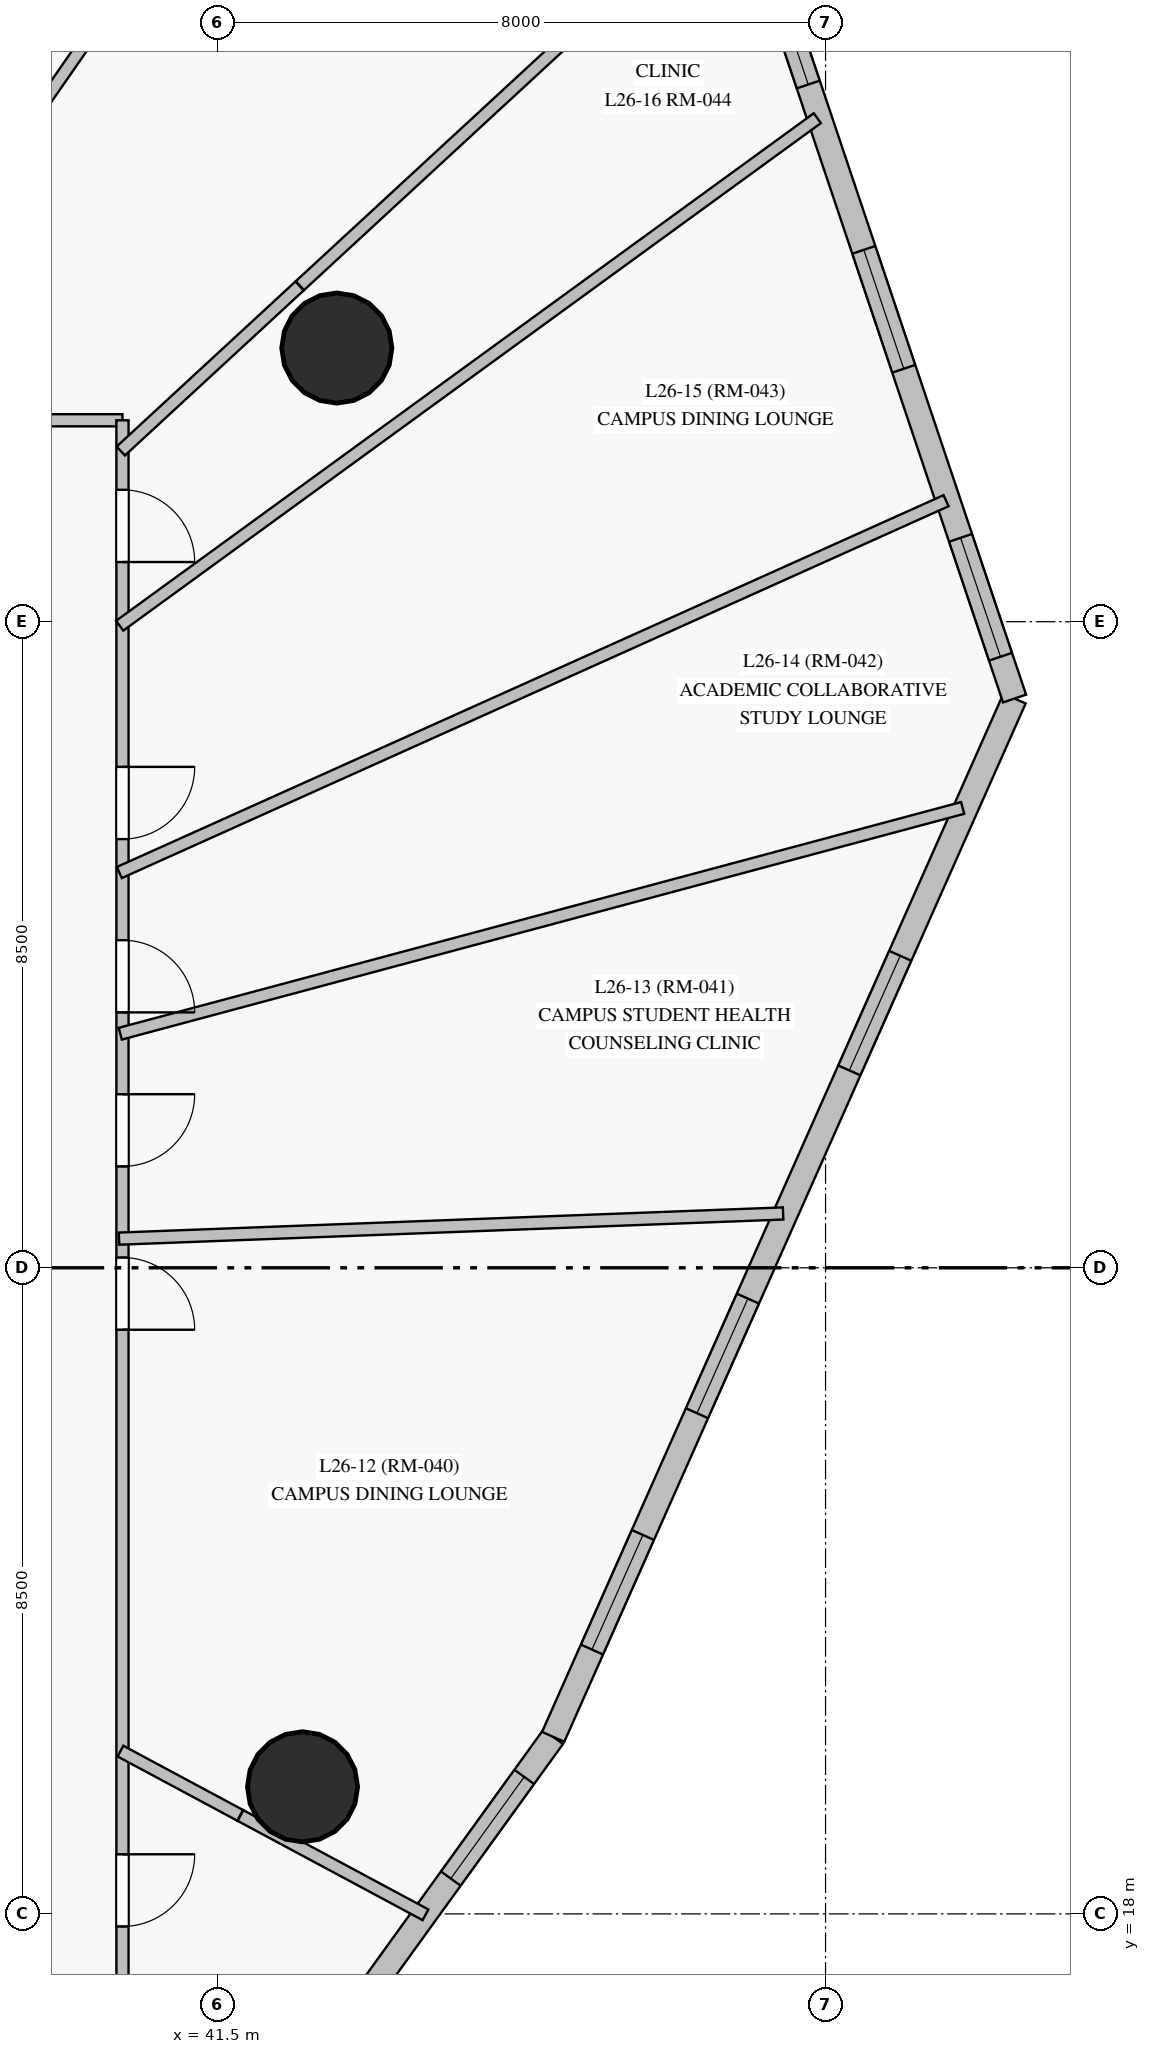
"""IFC4 building model, lengths in metres.
Left out: names, types, materials, properties, quantities, classifications, styles, units other than length and angle.
Written with IfcOpenShell. Run it as: python <this file> out.ifc"""

import sys

from ifc_helpers import new_model, si_unit, direction, frame, frame_2d, origin, origin_with_axes, origin_2d, place, context, subcontext, project, spatial, rectangle, circle, extrude, source, transform, mapped, element, fill, save


model = new_model("IFC4")
c1 = context("Model", 3, precision=1e-05, world=origin(), true_north=direction((0.0, 1.0)))
c2 = subcontext(c1, "Body", "Model", "MODEL_VIEW")
j1 = project(units=[si_unit("LENGTHUNIT", "METRE"), si_unit("PLANEANGLEUNIT", "RADIAN")], contexts=[c1])
p1 = place(None, origin())
s1 = spatial("IfcSite", under=j1, at=p1, CompositionType="ELEMENT")
p2 = place(p1, origin())
s2 = spatial("IfcBuilding", under=s1, at=p2, CompositionType="ELEMENT")
p3 = place(p2, frame((0.0, 0.0, 99.25)))
s3 = spatial("IfcBuildingStorey", under=s2, at=p3, CompositionType="ELEMENT", Elevation=99.25)
m1 = source(origin_with_axes(), c2, "Body", "SweptSolid", [
    extrude(circle(Radius=0.725, at=origin_2d()), origin(), (0.0, 0.0, 1.0), 3.05),
])
for number, where, z_axis, x_axis in (
    (1, (42.619, 19.672, 0.0), (0.0, 0.0, 1.0), (1.0, 0.0, 0.0)),
    (2, (43.07, 38.6, 0.0), (0.0, 0.0, 1.0), (1.0, 0.0, 0.0)),
):
    element("IfcColumn", number, at=place(p3, frame(where, z_axis=z_axis, x_axis=x_axis)), inside=s3, PredefinedType="COLUMN", context=c2, shape_type="MappedRepresentation", body=[
        mapped(m1, transform((0.0, 0.0, 0.0), scale=1.0)),
    ])
p4 = place(p3, frame((39.832, 11.906, 0.0), z_axis=(0.0, 0.0, 1.0), x_axis=(0.585524008993, 0.810655065298, 0.0)))
e3 = element("IfcWall", 3, at=p4, inside=s3, PredefinedType="SOLIDWALL", context=c2, shape_type="SweptSolid", body=[
    extrude(rectangle(XDim=10.391, YDim=0.32, at=frame_2d((5.196, 0.0))), origin(), (0.0, 0.0, 1.0), 2.825),
])
p5 = place(p4, frame((1.255, 0.0, 0.85)))
e4 = element("IfcOpeningElement", 4, at=p5, cuts=e3, PredefinedType="OPENING", context=c2, shape_type="SweptSolid", body=[
    extrude(rectangle(XDim=1.65, YDim=1.65, at=frame_2d((0.825, 0.825))), frame((0.0, 0.17, 0.0), z_axis=(0.0, -1.0, 0.0), x_axis=(1.0, 0.0, 0.0)), (0.0, 0.0, 1.0), 0.34),
])
p6 = place(p4, frame((4.656, 0.0, 0.85)))
e5 = element("IfcOpeningElement", 5, at=p6, cuts=e3, PredefinedType="OPENING", context=c2, shape_type="SweptSolid", body=[
    extrude(rectangle(XDim=1.65, YDim=1.65, at=frame_2d((0.825, 0.825))), frame((0.0, 0.17, 0.0), z_axis=(0.0, -1.0, 0.0), x_axis=(1.0, 0.0, 0.0)), (0.0, 0.0, 1.0), 0.34),
])
p7 = place(p4, frame((8.091, 0.0, 0.85)))
e6 = element("IfcOpeningElement", 6, at=p7, cuts=e3, PredefinedType="OPENING", context=c2, shape_type="SweptSolid", body=[
    extrude(rectangle(XDim=1.65, YDim=1.65, at=frame_2d((0.825, 0.825))), frame((0.0, 0.17, 0.0), z_axis=(0.0, -1.0, 0.0), x_axis=(1.0, 0.0, 0.0)), (0.0, 0.0, 1.0), 0.34),
])
p8 = place(p3, frame((45.917, 20.329, 0.0), z_axis=(0.0, 0.0, 1.0), x_axis=(0.406068755347, 0.913842527972, 0.0)))
e7 = element("IfcWall", 7, at=p8, inside=s3, PredefinedType="SOLIDWALL", context=c2, shape_type="SweptSolid", body=[
    extrude(rectangle(XDim=14.948, YDim=0.32, at=frame_2d((7.474, 0.0))), origin(), (0.0, 0.0, 1.0), 2.825),
])
p9 = place(p8, frame((1.256, 0.0, 0.85)))
e8 = element("IfcOpeningElement", 8, at=p9, cuts=e7, PredefinedType="OPENING", context=c2, shape_type="SweptSolid", body=[
    extrude(rectangle(XDim=1.65, YDim=1.65, at=frame_2d((0.825, 0.825))), frame((0.0, 0.17, 0.0), z_axis=(0.0, -1.0, 0.0), x_axis=(1.0, 0.0, 0.0)), (0.0, 0.0, 1.0), 0.34),
])
p10 = place(p8, frame((4.659, 0.0, 0.85)))
e9 = element("IfcOpeningElement", 9, at=p10, cuts=e7, PredefinedType="OPENING", context=c2, shape_type="SweptSolid", body=[
    extrude(rectangle(XDim=1.65, YDim=1.65, at=frame_2d((0.825, 0.825))), frame((0.0, 0.17, 0.0), z_axis=(0.0, -1.0, 0.0), x_axis=(1.0, 0.0, 0.0)), (0.0, 0.0, 1.0), 0.34),
])
p11 = place(p8, frame((9.594, 0.0, 0.85)))
e10 = element("IfcOpeningElement", 10, at=p11, cuts=e7, PredefinedType="OPENING", context=c2, shape_type="SweptSolid", body=[
    extrude(rectangle(XDim=1.65, YDim=1.65, at=frame_2d((0.825, 0.825))), frame((0.0, 0.17, 0.0), z_axis=(0.0, -1.0, 0.0), x_axis=(1.0, 0.0, 0.0)), (0.0, 0.0, 1.0), 0.34),
])
p12 = place(p3, frame((51.986, 33.989, 0.0), z_axis=(0.0, 0.0, 1.0), x_axis=(-0.318475543546, 0.947931077749, 0.0)))
e11 = element("IfcWall", 11, at=p12, inside=s3, PredefinedType="SOLIDWALL", context=c2, shape_type="SweptSolid", body=[
    extrude(rectangle(XDim=10.0, YDim=0.32, at=frame_2d((5.0, 0.0))), origin(), (0.0, 0.0, 1.0), 2.825),
])
p13 = place(p12, frame((0.58, 0.0, 0.85)))
e12 = element("IfcOpeningElement", 12, at=p13, cuts=e11, PredefinedType="OPENING", context=c2, shape_type="SweptSolid", body=[
    extrude(rectangle(XDim=1.65, YDim=1.65, at=frame_2d((0.825, 0.825))), frame((0.0, 0.17, 0.0), z_axis=(0.0, -1.0, 0.0), x_axis=(1.0, 0.0, 0.0)), (0.0, 0.0, 1.0), 0.34),
])
p14 = place(p12, frame((4.577, 0.0, 0.85)))
e13 = element("IfcOpeningElement", 13, at=p14, cuts=e11, PredefinedType="OPENING", context=c2, shape_type="SweptSolid", body=[
    extrude(rectangle(XDim=1.65, YDim=1.65, at=frame_2d((0.825, 0.825))), frame((0.0, 0.17, 0.0), z_axis=(0.0, -1.0, 0.0), x_axis=(1.0, 0.0, 0.0)), (0.0, 0.0, 1.0), 0.34),
])
p15 = place(p12, frame((8.521, 0.0, 0.85)))
e14 = element("IfcOpeningElement", 14, at=p15, cuts=e11, PredefinedType="OPENING", context=c2, shape_type="SweptSolid", body=[
    extrude(rectangle(XDim=0.95, YDim=1.5, at=frame_2d((0.475, 0.75))), frame((0.0, 0.17, 0.0), z_axis=(0.0, -1.0, 0.0), x_axis=(1.0, 0.0, 0.0)), (0.0, 0.0, 1.0), 0.34),
])
p16 = place(p3, frame((10.613, 37.65, 0.0), z_axis=(0.0, 0.0, 1.0), x_axis=(1.0, 0.0, 0.0)))
e15 = element("IfcWall", 15, at=p16, inside=s3, PredefinedType="PARTITIONING", context=c2, shape_type="SweptSolid", body=[
    extrude(rectangle(XDim=29.637, YDim=0.16, at=frame_2d((14.819, 0.0))), origin(), (0.0, 0.0, 1.0), 2.325),
])
p17 = place(p16, frame((27.147, 0.0, 0.0)))
e16 = element("IfcOpeningElement", 16, at=p17, cuts=e15, PredefinedType="OPENING", context=c2, shape_type="SweptSolid", body=[
    extrude(rectangle(XDim=0.95, YDim=2.15, at=frame_2d((0.475, 1.075))), frame((0.0, 0.09, 0.0), z_axis=(0.0, -1.0, 0.0), x_axis=(1.0, 0.0, 0.0)), (0.0, 0.0, 1.0), 0.18),
])
p18 = place(p16, frame((24.44, 0.0, 0.0)))
e17 = element("IfcOpeningElement", 17, at=p18, cuts=e15, PredefinedType="OPENING", context=c2, shape_type="SweptSolid", body=[
    extrude(rectangle(XDim=0.95, YDim=2.15, at=frame_2d((0.475, 1.075))), frame((0.0, 0.09, 0.0), z_axis=(0.0, -1.0, 0.0), x_axis=(1.0, 0.0, 0.0)), (0.0, 0.0, 1.0), 0.18),
])
p19 = place(p16, frame((22.358, 0.0, 0.0)))
e18 = element("IfcOpeningElement", 18, at=p19, cuts=e15, PredefinedType="OPENING", context=c2, shape_type="SweptSolid", body=[
    extrude(rectangle(XDim=0.95, YDim=2.15, at=frame_2d((0.475, 1.075))), frame((0.0, 0.09, 0.0), z_axis=(0.0, -1.0, 0.0), x_axis=(1.0, 0.0, 0.0)), (0.0, 0.0, 1.0), 0.18),
])
p20 = place(p16, frame((20.084, 0.0, 0.0)))
e19 = element("IfcOpeningElement", 19, at=p20, cuts=e15, PredefinedType="OPENING", context=c2, shape_type="SweptSolid", body=[
    extrude(rectangle(XDim=0.95, YDim=2.15, at=frame_2d((0.475, 1.075))), frame((0.0, 0.09, 0.0), z_axis=(0.0, -1.0, 0.0), x_axis=(1.0, 0.0, 0.0)), (0.0, 0.0, 1.0), 0.18),
])
p21 = place(p16, frame((18.225, 0.0, 0.0)))
e20 = element("IfcOpeningElement", 20, at=p21, cuts=e15, PredefinedType="OPENING", context=c2, shape_type="SweptSolid", body=[
    extrude(rectangle(XDim=0.95, YDim=2.15, at=frame_2d((0.475, 1.075))), frame((0.0, 0.09, 0.0), z_axis=(0.0, -1.0, 0.0), x_axis=(1.0, 0.0, 0.0)), (0.0, 0.0, 1.0), 0.18),
])
p22 = place(p16, frame((15.805, 0.0, 0.0)))
e21 = element("IfcOpeningElement", 21, at=p22, cuts=e15, PredefinedType="OPENING", context=c2, shape_type="SweptSolid", body=[
    extrude(rectangle(XDim=0.95, YDim=2.15, at=frame_2d((0.475, 1.075))), frame((0.0, 0.09, 0.0), z_axis=(0.0, -1.0, 0.0), x_axis=(1.0, 0.0, 0.0)), (0.0, 0.0, 1.0), 0.18),
])
p23 = place(p16, frame((10.148, 0.0, 0.0)))
e22 = element("IfcOpeningElement", 22, at=p23, cuts=e15, PredefinedType="OPENING", context=c2, shape_type="SweptSolid", body=[
    extrude(rectangle(XDim=0.95, YDim=2.15, at=frame_2d((0.475, 1.075))), frame((0.0, 0.09, 0.0), z_axis=(0.0, -1.0, 0.0), x_axis=(1.0, 0.0, 0.0)), (0.0, 0.0, 1.0), 0.18),
])
p24 = place(p16, frame((7.296, 0.0, 0.0)))
e23 = element("IfcOpeningElement", 23, at=p24, cuts=e15, PredefinedType="OPENING", context=c2, shape_type="SweptSolid", body=[
    extrude(rectangle(XDim=0.95, YDim=2.15, at=frame_2d((0.475, 1.075))), frame((0.0, 0.09, 0.0), z_axis=(0.0, -1.0, 0.0), x_axis=(1.0, 0.0, 0.0)), (0.0, 0.0, 1.0), 0.18),
])
p25 = place(p3, frame((40.25, 37.65, 0.0), z_axis=(0.0, 0.0, 1.0), x_axis=(0.0, -1.0, 0.0)))
e24 = element("IfcWall", 24, at=p25, inside=s3, PredefinedType="PARTITIONING", context=c2, shape_type="SweptSolid", body=[
    extrude(rectangle(XDim=22.3, YDim=0.16, at=frame_2d((11.15, 0.0))), origin(), (0.0, 0.0, 1.0), 2.225),
])
p26 = place(p25, frame((18.866, 0.0, 0.0)))
e25 = element("IfcOpeningElement", 25, at=p26, cuts=e24, PredefinedType="OPENING", context=c2, shape_type="SweptSolid", body=[
    extrude(rectangle(XDim=0.95, YDim=2.15, at=frame_2d((0.475, 1.075))), frame((0.0, 0.09, 0.0), z_axis=(0.0, -1.0, 0.0), x_axis=(1.0, 0.0, 0.0)), (0.0, 0.0, 1.0), 0.18),
])
p27 = place(p25, frame((11.015, 0.0, 0.0)))
e26 = element("IfcOpeningElement", 26, at=p27, cuts=e24, PredefinedType="OPENING", context=c2, shape_type="SweptSolid", body=[
    extrude(rectangle(XDim=0.95, YDim=2.15, at=frame_2d((0.475, 1.075))), frame((0.0, 0.09, 0.0), z_axis=(0.0, -1.0, 0.0), x_axis=(1.0, 0.0, 0.0)), (0.0, 0.0, 1.0), 0.18),
])
p28 = place(p25, frame((8.866, 0.0, 0.0)))
e27 = element("IfcOpeningElement", 27, at=p28, cuts=e24, PredefinedType="OPENING", context=c2, shape_type="SweptSolid", body=[
    extrude(rectangle(XDim=0.95, YDim=2.15, at=frame_2d((0.475, 1.075))), frame((0.0, 0.09, 0.0), z_axis=(0.0, -1.0, 0.0), x_axis=(1.0, 0.0, 0.0)), (0.0, 0.0, 1.0), 0.18),
])
p29 = place(p25, frame((6.84, 0.0, 0.0)))
e28 = element("IfcOpeningElement", 28, at=p29, cuts=e24, PredefinedType="OPENING", context=c2, shape_type="SweptSolid", body=[
    extrude(rectangle(XDim=0.95, YDim=2.15, at=frame_2d((0.475, 1.075))), frame((0.0, 0.09, 0.0), z_axis=(0.0, -1.0, 0.0), x_axis=(1.0, 0.0, 0.0)), (0.0, 0.0, 1.0), 0.18),
])
p30 = place(p25, frame((4.56, 0.0, 0.0)))
e29 = element("IfcOpeningElement", 29, at=p30, cuts=e24, PredefinedType="OPENING", context=c2, shape_type="SweptSolid", body=[
    extrude(rectangle(XDim=0.95, YDim=2.15, at=frame_2d((0.475, 1.075))), frame((0.0, 0.09, 0.0), z_axis=(0.0, -1.0, 0.0), x_axis=(1.0, 0.0, 0.0)), (0.0, 0.0, 1.0), 0.18),
])
p31 = place(p25, frame((0.915, 0.0, 0.0)))
e30 = element("IfcOpeningElement", 30, at=p31, cuts=e24, PredefinedType="OPENING", context=c2, shape_type="SweptSolid", body=[
    extrude(rectangle(XDim=0.95, YDim=2.15, at=frame_2d((0.475, 1.075))), frame((0.0, 0.09, 0.0), z_axis=(0.0, -1.0, 0.0), x_axis=(1.0, 0.0, 0.0)), (0.0, 0.0, 1.0), 0.18),
])
p32 = place(p3, frame((34.518, 37.61, 0.0), z_axis=(0.0, 0.0, 1.0), x_axis=(0.472106285864, 0.881541635346, 0.0)))
e31 = element("IfcWall", 31, at=p32, inside=s3, PredefinedType="PARTITIONING", context=c2, shape_type="SweptSolid", body=[
    extrude(rectangle(XDim=12.123, YDim=0.16, at=frame_2d((6.062, 0.0))), origin(), (0.0, 0.0, 1.0), 2.825),
])
p33 = place(p3, frame((40.209, 31.7, 0.0), z_axis=(0.0, 0.0, 1.0), x_axis=(0.912009584373, 0.410168889619, 0.0)))
e32 = element("IfcWall", 32, at=p33, inside=s3, PredefinedType="PARTITIONING", context=c2, shape_type="SweptSolid", body=[
    extrude(rectangle(XDim=11.926, YDim=0.16, at=frame_2d((5.963, 0.0))), origin(), (0.0, 0.0, 1.0), 2.825),
])
p34 = place(p3, frame((40.221, 29.579, 0.0), z_axis=(0.0, 0.0, 1.0), x_axis=(0.965907490829, 0.258887464278, 0.0)))
e33 = element("IfcWall", 33, at=p34, inside=s3, PredefinedType="PARTITIONING", context=c2, shape_type="SweptSolid", body=[
    extrude(rectangle(XDim=11.474, YDim=0.16, at=frame_2d((5.737, 0.0))), origin(), (0.0, 0.0, 1.0), 2.825),
])
p35 = place(p3, frame((40.214, 34.947, 0.0), z_axis=(0.0, 0.0, 1.0), x_axis=(0.808655151719, 0.588282963887, 0.0)))
e34 = element("IfcWall", 34, at=p35, inside=s3, PredefinedType="PARTITIONING", context=c2, shape_type="SweptSolid", body=[
    extrude(rectangle(XDim=11.35, YDim=0.16, at=frame_2d((5.675, 0.0))), origin(), (0.0, 0.0, 1.0), 2.825),
])
p36 = place(p3, frame((36.285, 37.613, 0.0), z_axis=(0.0, 0.0, 1.0), x_axis=(0.570151843244, 0.821539332987, 0.0)))
e35 = element("IfcWall", 35, at=p36, inside=s3, PredefinedType="PARTITIONING", context=c2, shape_type="SweptSolid", body=[
    extrude(rectangle(XDim=11.291, YDim=0.16, at=frame_2d((5.646, 0.0))), origin(), (0.0, 0.0, 1.0), 2.825),
])
p37 = place(p3, frame((40.205, 26.884, 0.0), z_axis=(0.0, 0.0, 1.0), x_axis=(0.999281776552, 0.037893680894, 0.0)))
e36 = element("IfcWall", 36, at=p37, inside=s3, PredefinedType="PARTITIONING", context=c2, shape_type="SweptSolid", body=[
    extrude(rectangle(XDim=8.743, YDim=0.16, at=frame_2d((4.372, 0.0))), origin(), (0.0, 0.0, 1.0), 2.825),
])
p38 = place(p3, frame((42.584, 39.42, 0.0), z_axis=(0.0, 0.0, 1.0), x_axis=(0.734757240963, 0.678330153283, 0.0)))
e37 = element("IfcWall", 37, at=p38, inside=s3, PredefinedType="PARTITIONING", context=c2, shape_type="SweptSolid", body=[
    extrude(rectangle(XDim=6.888, YDim=0.16, at=frame_2d((3.444, 0.0))), origin(), (0.0, 0.0, 1.0), 2.825),
])
p39 = place(p3, frame((40.228, 37.245, 0.0), z_axis=(0.0, 0.0, 1.0), x_axis=(0.734765427386, 0.678321285762, 0.0)))
e38 = element("IfcWall", 38, at=p39, inside=s3, PredefinedType="PARTITIONING", context=c2, shape_type="SweptSolid", body=[
    extrude(rectangle(XDim=3.201, YDim=0.16, at=frame_2d((1.6, 0.0))), origin(), (0.0, 0.0, 1.0), 2.225),
])
p40 = place(p3, frame((40.224, 20.142, 0.0), z_axis=(0.0, 0.0, 1.0), x_axis=(0.881136678739, -0.472861664106, 0.0)))
e39 = element("IfcWall", 39, at=p40, inside=s3, PredefinedType="PARTITIONING", context=c2, shape_type="SweptSolid", body=[
    extrude(rectangle(XDim=1.788, YDim=0.16, at=frame_2d((0.894, 0.0))), origin(), (0.0, 0.0, 1.0), 2.225),
])
p41 = place(p3, frame((41.803, 19.294, 0.0), z_axis=(0.0, 0.0, 1.0), x_axis=(0.881165658259, -0.472807659313, 0.0)))
e40 = element("IfcWall", 40, at=p41, inside=s3, PredefinedType="PARTITIONING", context=c2, shape_type="SweptSolid", body=[
    extrude(rectangle(XDim=2.761, YDim=0.16, at=frame_2d((1.381, 0.0))), origin(), (0.0, 0.0, 1.0), 2.225),
])
m2 = source(origin_with_axes(), c2, "Body", "SweptSolid", [
    extrude(rectangle(XDim=1.65, YDim=1.65, at=frame_2d((0.825, 0.825))), frame((0.0, 0.03, 0.0), z_axis=(0.0, -1.0, 0.0), x_axis=(1.0, 0.0, 0.0)), (0.0, 0.0, 1.0), 0.06),
])
p42 = place(p7, origin())
e41 = element("IfcWindow", 41, at=p42, inside=s3, PartitioningType="SINGLE_PANEL", PredefinedType="WINDOW", context=c2, shape_type="MappedRepresentation", body=[
    mapped(m2, transform((0.0, 0.0, 0.0), scale=1.0)),
])
fill(e6, e41)
p43 = place(p9, origin())
e42 = element("IfcWindow", 42, at=p43, inside=s3, PartitioningType="SINGLE_PANEL", PredefinedType="WINDOW", context=c2, shape_type="MappedRepresentation", body=[
    mapped(m2, transform((0.0, 0.0, 0.0), scale=1.0)),
])
fill(e8, e42)
p44 = place(p10, origin())
e43 = element("IfcWindow", 43, at=p44, inside=s3, PartitioningType="SINGLE_PANEL", PredefinedType="WINDOW", context=c2, shape_type="MappedRepresentation", body=[
    mapped(m2, transform((0.0, 0.0, 0.0), scale=1.0)),
])
fill(e9, e43)
p45 = place(p11, origin())
e44 = element("IfcWindow", 44, at=p45, inside=s3, PartitioningType="SINGLE_PANEL", PredefinedType="WINDOW", context=c2, shape_type="MappedRepresentation", body=[
    mapped(m2, transform((0.0, 0.0, 0.0), scale=1.0)),
])
fill(e10, e44)
p46 = place(p13, origin())
e45 = element("IfcWindow", 45, at=p46, inside=s3, PartitioningType="SINGLE_PANEL", PredefinedType="WINDOW", context=c2, shape_type="MappedRepresentation", body=[
    mapped(m2, transform((0.0, 0.0, 0.0), scale=1.0)),
])
fill(e12, e45)
p47 = place(p14, origin())
e46 = element("IfcWindow", 46, at=p47, inside=s3, PartitioningType="SINGLE_PANEL", PredefinedType="WINDOW", context=c2, shape_type="MappedRepresentation", body=[
    mapped(m2, transform((0.0, 0.0, 0.0), scale=1.0)),
])
fill(e13, e46)
m3 = source(origin_with_axes(), c2, "Body", "SweptSolid", [
    extrude(rectangle(XDim=0.95, YDim=1.5, at=frame_2d((0.475, 0.75))), frame((0.0, 0.03, 0.0), z_axis=(0.0, -1.0, 0.0), x_axis=(1.0, 0.0, 0.0)), (0.0, 0.0, 1.0), 0.06),
])
p48 = place(p15, origin())
e47 = element("IfcWindow", 47, at=p48, inside=s3, PartitioningType="SINGLE_PANEL", PredefinedType="WINDOW", context=c2, shape_type="MappedRepresentation", body=[
    mapped(m3, transform((0.0, 0.0, 0.0), scale=1.0)),
])
fill(e14, e47)
m4 = source(origin_with_axes(), c2, "Body", "SweptSolid", [
    extrude(rectangle(XDim=0.95, YDim=2.15, at=frame_2d((0.475, 1.075))), frame((0.0, 0.025, 0.0), z_axis=(0.0, -1.0, 0.0), x_axis=(1.0, 0.0, 0.0)), (0.0, 0.0, 1.0), 0.05),
])
p49 = place(p26, origin())
e48 = element("IfcDoor", 48, at=p49, inside=s3, OperationType="SINGLE_SWING_LEFT", PredefinedType="DOOR", context=c2, shape_type="MappedRepresentation", body=[
    mapped(m4, transform((0.0, 0.0, 0.0), scale=1.0)),
])
fill(e25, e48)
p50 = place(p27, origin())
e49 = element("IfcDoor", 49, at=p50, inside=s3, OperationType="SINGLE_SWING_RIGHT", PredefinedType="DOOR", context=c2, shape_type="MappedRepresentation", body=[
    mapped(m4, transform((0.0, 0.0, 0.0), scale=1.0)),
])
fill(e26, e49)
p51 = place(p28, origin())
e50 = element("IfcDoor", 50, at=p51, inside=s3, OperationType="SINGLE_SWING_LEFT", PredefinedType="DOOR", context=c2, shape_type="MappedRepresentation", body=[
    mapped(m4, transform((0.0, 0.0, 0.0), scale=1.0)),
])
fill(e27, e50)
p52 = place(p29, origin())
e51 = element("IfcDoor", 51, at=p52, inside=s3, OperationType="SINGLE_SWING_RIGHT", PredefinedType="DOOR", context=c2, shape_type="MappedRepresentation", body=[
    mapped(m4, transform((0.0, 0.0, 0.0), scale=1.0)),
])
fill(e28, e51)
p53 = place(p30, origin())
e52 = element("IfcDoor", 52, at=p53, inside=s3, OperationType="SINGLE_SWING_LEFT", PredefinedType="DOOR", context=c2, shape_type="MappedRepresentation", body=[
    mapped(m4, transform((0.0, 0.0, 0.0), scale=1.0)),
])
fill(e29, e52)
p54 = place(p31, origin())
e53 = element("IfcDoor", 53, at=p54, inside=s3, OperationType="SINGLE_SWING_RIGHT", PredefinedType="DOOR", context=c2, shape_type="MappedRepresentation", body=[
    mapped(m4, transform((0.0, 0.0, 0.0), scale=1.0)),
])
fill(e30, e53)
save(model, sys.argv[1])
